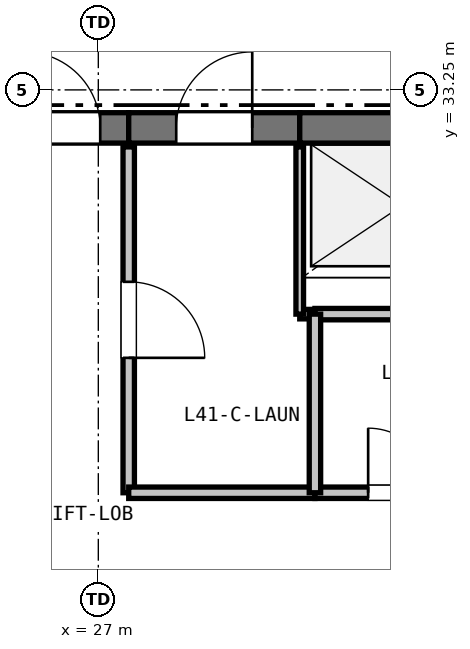
"""IFC4 building model, lengths in metres.
Left out: names, types, materials, properties, quantities, classifications, styles, units other than length and angle.
Written with IfcOpenShell. Run it as: python <this file> out.ifc"""

import sys

from ifc_helpers import new_model, si_unit, direction, frame, frame_2d, origin, place, context, subcontext, project, spatial, rectangle, extrude, element, fill, save


model = new_model("IFC4")
c1 = context("Model", 3, precision=1e-05, world=origin(), true_north=direction((0.0, 1.0)))
c2 = subcontext(c1, "Body", "Model", "MODEL_VIEW")
j1 = project(units=[si_unit("LENGTHUNIT", "METRE"), si_unit("PLANEANGLEUNIT", "RADIAN")], contexts=[c1])
p1 = place(None, origin())
s1 = spatial("IfcSite", under=j1, at=p1, CompositionType="ELEMENT")
p2 = place(p1, origin())
s2 = spatial("IfcBuilding", under=s1, at=p2, CompositionType="ELEMENT")
p3 = place(p2, frame((0.0, 0.0, 147.6)))
s3 = spatial("IfcBuildingStorey", under=s2, at=p3, CompositionType="ELEMENT", Elevation=147.6)
p4 = place(p3, frame((25.65, 32.75, 0.0), z_axis=(0.0, 0.0, 1.0), x_axis=(1.0, 0.0, 0.0)))
e1 = element("IfcWall", 1, at=p4, inside=s3, PredefinedType="SHEAR", context=c2, shape_type="SweptSolid", body=[
    extrude(rectangle(XDim=1.75, YDim=0.4, at=frame_2d((0.875, 0.0))), origin(), (0.0, 0.0, 1.0), 3.06),
])
p5 = place(p4, frame((0.375, 0.0, 0.0)))
e2 = element("IfcOpeningElement", 2, at=p5, cuts=e1, PredefinedType="OPENING", context=c2, shape_type="SweptSolid", body=[
    extrude(rectangle(XDim=1.0, YDim=2.15, at=frame_2d((0.5, 1.075))), frame((0.0, 0.21, 0.0), z_axis=(0.0, -1.0, 0.0), x_axis=(1.0, 0.0, 0.0)), (0.0, 0.0, 1.0), 0.42),
])
p6 = place(p3, frame((27.4, 32.75, 0.0), z_axis=(0.0, 0.0, 1.0), x_axis=(1.0, 0.0, 0.0)))
e3 = element("IfcWall", 3, at=p6, inside=s3, PredefinedType="SHEAR", context=c2, shape_type="SweptSolid", body=[
    extrude(rectangle(XDim=2.25, YDim=0.4, at=frame_2d((1.125, 0.0))), origin(), (0.0, 0.0, 1.0), 3.06),
])
p7 = place(p6, frame((0.625, 0.0, 0.0)))
e4 = element("IfcOpeningElement", 4, at=p7, cuts=e3, PredefinedType="OPENING", context=c2, shape_type="SweptSolid", body=[
    extrude(rectangle(XDim=1.0, YDim=2.15, at=frame_2d((0.5, 1.075))), frame((0.0, 0.21, 0.0), z_axis=(0.0, -1.0, 0.0), x_axis=(1.0, 0.0, 0.0)), (0.0, 0.0, 1.0), 0.42),
])
p8 = place(p3, frame((29.65, 32.75, 0.0), z_axis=(0.0, 0.0, 1.0), x_axis=(1.0, 0.0, 0.0)))
e5 = element("IfcWall", 5, at=p8, inside=s3, PredefinedType="SHEAR", context=c2, shape_type="SweptSolid", body=[
    extrude(rectangle(XDim=2.7, YDim=0.4, at=frame_2d((1.35, 0.0))), origin(), (0.0, 0.0, 1.0), 3.06),
])
p9 = place(p3, frame((32.1, 30.3, 0.0), z_axis=(0.0, 0.0, 1.0), x_axis=(-1.0, 0.0, 0.0)))
e6 = element("IfcWall", 6, at=p9, inside=s3, PredefinedType="PARTITIONING", context=c2, shape_type="SweptSolid", body=[
    extrude(rectangle(XDim=2.25, YDim=0.15, at=frame_2d((1.125, 0.0))), origin(), (0.0, 0.0, 1.0), 3.06),
])
p10 = place(p3, frame((29.85, 30.3, 0.0), z_axis=(0.0, 0.0, 1.0), x_axis=(-1.0, 0.0, 0.0)))
e7 = element("IfcWall", 7, at=p10, inside=s3, PredefinedType="PARTITIONING", context=c2, shape_type="SweptSolid", body=[
    extrude(rectangle(XDim=0.2, YDim=0.125, at=frame_2d((0.1, 0.0))), origin(), (0.0, 0.0, 1.0), 3.06),
])
p11 = place(p3, frame((29.65, 30.3, 0.0), z_axis=(0.0, 0.0, 1.0), x_axis=(0.0, 1.0, 0.0)))
e8 = element("IfcWall", 8, at=p11, inside=s3, PredefinedType="PARTITIONING", context=c2, shape_type="SweptSolid", body=[
    extrude(rectangle(XDim=2.2, YDim=0.1, at=frame_2d((1.1, 0.0))), origin(), (0.0, 0.0, 1.0), 3.06),
])
p12 = place(p3, frame((27.4, 32.5, 0.0), z_axis=(0.0, 0.0, 1.0), x_axis=(0.0, -1.0, 0.0)))
e9 = element("IfcWall", 9, at=p12, inside=s3, PredefinedType="PARTITIONING", context=c2, shape_type="SweptSolid", body=[
    extrude(rectangle(XDim=4.55, YDim=0.15, at=frame_2d((2.275, 0.0))), origin(), (0.0, 0.0, 1.0), 3.06),
])
p13 = place(p12, frame((1.775, 0.0, 0.0)))
e10 = element("IfcOpeningElement", 10, at=p13, cuts=e9, PredefinedType="OPENING", context=c2, shape_type="SweptSolid", body=[
    extrude(rectangle(XDim=1.0, YDim=2.15, at=frame_2d((0.5, 1.075))), frame((0.0, 0.085, 0.0), z_axis=(0.0, -1.0, 0.0), x_axis=(1.0, 0.0, 0.0)), (0.0, 0.0, 1.0), 0.17),
])
p14 = place(p3, frame((27.4, 27.95, 0.0), z_axis=(0.0, 0.0, 1.0), x_axis=(1.0, 0.0, 0.0)))
e11 = element("IfcWall", 11, at=p14, inside=s3, PredefinedType="PARTITIONING", context=c2, shape_type="SweptSolid", body=[
    extrude(rectangle(XDim=2.45, YDim=0.15, at=frame_2d((1.225, 0.0))), origin(), (0.0, 0.0, 1.0), 3.06),
])
p15 = place(p3, frame((29.85, 27.95, 0.0), z_axis=(0.0, 0.0, 1.0), x_axis=(1.0, 0.0, 0.0)))
e12 = element("IfcWall", 12, at=p15, inside=s3, PredefinedType="PARTITIONING", context=c2, shape_type="SweptSolid", body=[
    extrude(rectangle(XDim=2.25, YDim=0.15, at=frame_2d((1.125, 0.0))), origin(), (0.0, 0.0, 1.0), 3.06),
])
p16 = place(p15, frame((0.7, 0.0, 0.0)))
e13 = element("IfcOpeningElement", 13, at=p16, cuts=e12, PredefinedType="OPENING", context=c2, shape_type="SweptSolid", body=[
    extrude(rectangle(XDim=0.85, YDim=2.1, at=frame_2d((0.425, 1.05))), frame((0.0, 0.085, 0.0), z_axis=(0.0, -1.0, 0.0), x_axis=(1.0, 0.0, 0.0)), (0.0, 0.0, 1.0), 0.17),
])
p17 = place(p3, frame((29.85, 30.3, 0.0), z_axis=(0.0, 0.0, 1.0), x_axis=(0.0, -1.0, 0.0)))
e14 = element("IfcWall", 14, at=p17, inside=s3, PredefinedType="PARTITIONING", context=c2, shape_type="SweptSolid", body=[
    extrude(rectangle(XDim=2.35, YDim=0.15, at=frame_2d((1.175, 0.0))), origin(), (0.0, 0.0, 1.0), 3.06),
])
p18 = place(p5, origin())
e15 = element("IfcDoor", 15, at=p18, inside=s3, OperationType="SINGLE_SWING_LEFT", PredefinedType="DOOR", context=c2, shape_type="SweptSolid", body=[
    extrude(rectangle(XDim=1.0, YDim=2.15, at=frame_2d((0.5, 1.075))), frame((0.0, 0.025, 0.0), z_axis=(0.0, -1.0, 0.0), x_axis=(1.0, 0.0, 0.0)), (0.0, 0.0, 1.0), 0.05),
])
fill(e2, e15)
p19 = place(p13, origin())
e16 = element("IfcDoor", 16, at=p19, inside=s3, OperationType="SINGLE_SWING_RIGHT", PredefinedType="DOOR", context=c2, shape_type="SweptSolid", body=[
    extrude(rectangle(XDim=1.0, YDim=2.15, at=frame_2d((0.5, 1.075))), frame((0.0, 0.025, 0.0), z_axis=(0.0, -1.0, 0.0), x_axis=(1.0, 0.0, 0.0)), (0.0, 0.0, 1.0), 0.05),
])
fill(e10, e16)
p20 = place(p16, origin())
e17 = element("IfcDoor", 17, at=p20, inside=s3, OperationType="SINGLE_SWING_LEFT", PredefinedType="DOOR", context=c2, shape_type="SweptSolid", body=[
    extrude(rectangle(XDim=0.85, YDim=2.1, at=frame_2d((0.425, 1.05))), frame((0.0, 0.025, 0.0), z_axis=(0.0, -1.0, 0.0), x_axis=(1.0, 0.0, 0.0)), (0.0, 0.0, 1.0), 0.05),
])
fill(e13, e17)
p21 = place(p7, origin())
e18 = element("IfcDoor", 18, at=p21, inside=s3, OperationType="SINGLE_SWING_RIGHT", PredefinedType="DOOR", context=c2, shape_type="SweptSolid", body=[
    extrude(rectangle(XDim=1.0, YDim=2.15, at=frame_2d((0.5, 1.075))), frame((0.0, 0.025, 0.0), z_axis=(0.0, -1.0, 0.0), x_axis=(1.0, 0.0, 0.0)), (0.0, 0.0, 1.0), 0.05),
])
fill(e4, e18)
save(model, sys.argv[1])
